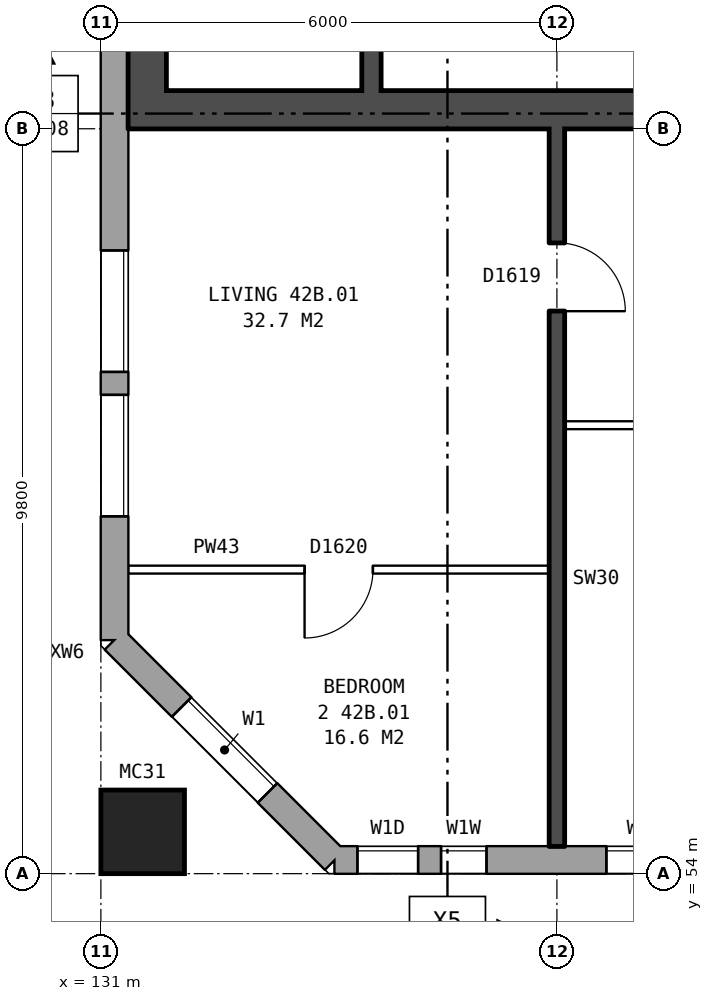
"""IFC4 building model, lengths in metres.
Left out: names, types, materials, properties, quantities, classifications, styles, units other than length and angle.
Written with IfcOpenShell. Run it as: python <this file> out.ifc"""

import sys

from ifc_helpers import new_model, si_unit, direction, frame, frame_2d, origin, origin_2d, place, context, subcontext, project, spatial, rectangle, hollow_rectangle, extrude, element, fill, save


model = new_model("IFC4")
c1 = context("Model", 3, precision=1e-05, world=origin(), true_north=direction((0.0, 1.0)))
c2 = subcontext(c1, "Body", "Model", "MODEL_VIEW")
j1 = project(units=[si_unit("LENGTHUNIT", "METRE"), si_unit("PLANEANGLEUNIT", "RADIAN")], contexts=[c1])
p1 = place(None, origin())
s1 = spatial("IfcSite", under=j1, at=p1, CompositionType="ELEMENT")
p2 = place(p1, origin())
s2 = spatial("IfcBuilding", under=s1, at=p2, CompositionType="ELEMENT")
p3 = place(p2, frame((0.0, 0.0, 151.6)))
s3 = spatial("IfcBuildingStorey", under=s2, at=p3, CompositionType="ELEMENT", Elevation=151.6)
p4 = place(p3, frame((131.55, 54.55, 0.0), z_axis=(0.0, 0.0, 1.0), x_axis=(1.0, 0.0, 0.0)))
e1 = element("IfcColumn", 1, at=p4, inside=s3, PredefinedType="COLUMN", context=c2, shape_type="SweptSolid", body=[
    extrude(hollow_rectangle(XDim=1.1, YDim=1.1, WallThickness=0.06, at=origin_2d()), origin(), (0.0, 0.0, 1.0), 3.1),
])
p5 = place(p3, frame((131.18, 57.075, 0.0), z_axis=(0.0, 0.0, 1.0), x_axis=(0.707106781187, -0.707106781187, 0.0)))
e2 = element("IfcWall", 2, at=p5, inside=s3, PredefinedType="STANDARD", context=c2, shape_type="SweptSolid", body=[
    extrude(rectangle(XDim=4.094, YDim=0.36, at=frame_2d((2.047, 0.0))), origin(), (0.0, 0.0, 1.0), 2.85),
])
p6 = place(p5, frame((1.247, 0.0, 0.8)))
e3 = element("IfcOpeningElement", 3, at=p6, cuts=e2, PredefinedType="OPENING", context=c2, shape_type="SweptSolid", body=[
    extrude(rectangle(XDim=1.6, YDim=1.8, at=frame_2d((0.8, 0.9))), frame((0.0, 0.19, 0.0), z_axis=(0.0, -1.0, 0.0), x_axis=(1.0, 0.0, 0.0)), (0.0, 0.0, 1.0), 0.38),
])
p7 = place(p3, frame((134.075, 54.18, 0.0), z_axis=(0.0, 0.0, 1.0), x_axis=(1.0, 0.0, 0.0)))
e4 = element("IfcWall", 4, at=p7, inside=s3, PredefinedType="STANDARD", context=c2, shape_type="SweptSolid", body=[
    extrude(rectangle(XDim=34.351, YDim=0.36, at=frame_2d((17.175, 0.0))), origin(), (0.0, 0.0, 1.0), 2.85),
])
p8 = place(p7, frame((0.3, 0.0, 0.8)))
e5 = element("IfcOpeningElement", 5, at=p8, cuts=e4, PredefinedType="OPENING", context=c2, shape_type="SweptSolid", body=[
    extrude(rectangle(XDim=0.8, YDim=1.8, at=frame_2d((0.4, 0.9))), frame((0.0, 0.19, 0.0), z_axis=(0.0, -1.0, 0.0), x_axis=(1.0, 0.0, 0.0)), (0.0, 0.0, 1.0), 0.38),
])
p9 = place(p7, frame((3.575, 0.0, 0.8)))
e6 = element("IfcOpeningElement", 6, at=p9, cuts=e4, PredefinedType="OPENING", context=c2, shape_type="SweptSolid", body=[
    extrude(rectangle(XDim=1.0, YDim=1.2, at=frame_2d((0.5, 0.6))), frame((0.0, 0.19, 0.0), z_axis=(0.0, -1.0, 0.0), x_axis=(1.0, 0.0, 0.0)), (0.0, 0.0, 1.0), 0.38),
])
p10 = place(p7, frame((6.625, 0.0, 0.8)))
e7 = element("IfcOpeningElement", 7, at=p10, cuts=e4, PredefinedType="OPENING", context=c2, shape_type="SweptSolid", body=[
    extrude(rectangle(XDim=1.6, YDim=1.8, at=frame_2d((0.8, 0.9))), frame((0.0, 0.19, 0.0), z_axis=(0.0, -1.0, 0.0), x_axis=(1.0, 0.0, 0.0)), (0.0, 0.0, 1.0), 0.38),
])
p11 = place(p7, frame((9.625, 0.0, 0.8)))
e8 = element("IfcOpeningElement", 8, at=p11, cuts=e4, PredefinedType="OPENING", context=c2, shape_type="SweptSolid", body=[
    extrude(rectangle(XDim=1.6, YDim=1.8, at=frame_2d((0.8, 0.9))), frame((0.0, 0.19, 0.0), z_axis=(0.0, -1.0, 0.0), x_axis=(1.0, 0.0, 0.0)), (0.0, 0.0, 1.0), 0.38),
])
p12 = place(p7, frame((12.625, 0.0, 0.8)))
e9 = element("IfcOpeningElement", 9, at=p12, cuts=e4, PredefinedType="OPENING", context=c2, shape_type="SweptSolid", body=[
    extrude(rectangle(XDim=1.6, YDim=1.8, at=frame_2d((0.8, 0.9))), frame((0.0, 0.19, 0.0), z_axis=(0.0, -1.0, 0.0), x_axis=(1.0, 0.0, 0.0)), (0.0, 0.0, 1.0), 0.38),
])
p13 = place(p7, frame((15.625, 0.0, 0.8)))
e10 = element("IfcOpeningElement", 10, at=p13, cuts=e4, PredefinedType="OPENING", context=c2, shape_type="SweptSolid", body=[
    extrude(rectangle(XDim=1.6, YDim=1.8, at=frame_2d((0.8, 0.9))), frame((0.0, 0.19, 0.0), z_axis=(0.0, -1.0, 0.0), x_axis=(1.0, 0.0, 0.0)), (0.0, 0.0, 1.0), 0.38),
])
p14 = place(p7, frame((18.625, 0.0, 0.8)))
e11 = element("IfcOpeningElement", 11, at=p14, cuts=e4, PredefinedType="OPENING", context=c2, shape_type="SweptSolid", body=[
    extrude(rectangle(XDim=1.6, YDim=1.8, at=frame_2d((0.8, 0.9))), frame((0.0, 0.19, 0.0), z_axis=(0.0, -1.0, 0.0), x_axis=(1.0, 0.0, 0.0)), (0.0, 0.0, 1.0), 0.38),
])
p15 = place(p7, frame((21.625, 0.0, 0.8)))
e12 = element("IfcOpeningElement", 12, at=p15, cuts=e4, PredefinedType="OPENING", context=c2, shape_type="SweptSolid", body=[
    extrude(rectangle(XDim=1.6, YDim=1.8, at=frame_2d((0.8, 0.9))), frame((0.0, 0.19, 0.0), z_axis=(0.0, -1.0, 0.0), x_axis=(1.0, 0.0, 0.0)), (0.0, 0.0, 1.0), 0.38),
])
p16 = place(p7, frame((24.625, 0.0, 0.8)))
e13 = element("IfcOpeningElement", 13, at=p16, cuts=e4, PredefinedType="OPENING", context=c2, shape_type="SweptSolid", body=[
    extrude(rectangle(XDim=1.6, YDim=1.8, at=frame_2d((0.8, 0.9))), frame((0.0, 0.19, 0.0), z_axis=(0.0, -1.0, 0.0), x_axis=(1.0, 0.0, 0.0)), (0.0, 0.0, 1.0), 0.38),
])
p17 = place(p7, frame((27.625, 0.0, 0.8)))
e14 = element("IfcOpeningElement", 14, at=p17, cuts=e4, PredefinedType="OPENING", context=c2, shape_type="SweptSolid", body=[
    extrude(rectangle(XDim=1.6, YDim=1.8, at=frame_2d((0.8, 0.9))), frame((0.0, 0.19, 0.0), z_axis=(0.0, -1.0, 0.0), x_axis=(1.0, 0.0, 0.0)), (0.0, 0.0, 1.0), 0.38),
])
p18 = place(p7, frame((29.525, 0.0, 0.8)))
e15 = element("IfcOpeningElement", 15, at=p18, cuts=e4, PredefinedType="OPENING", context=c2, shape_type="SweptSolid", body=[
    extrude(rectangle(XDim=0.6, YDim=1.8, at=frame_2d((0.3, 0.9))), frame((0.0, 0.19, 0.0), z_axis=(0.0, -1.0, 0.0), x_axis=(1.0, 0.0, 0.0)), (0.0, 0.0, 1.0), 0.38),
])
p19 = place(p7, frame((1.4, 0.0, 1.6)))
e16 = element("IfcOpeningElement", 16, at=p19, cuts=e4, PredefinedType="OPENING", context=c2, shape_type="SweptSolid", body=[
    extrude(rectangle(XDim=0.6, YDim=0.9, at=frame_2d((0.3, 0.45))), frame((0.0, 0.19, 0.0), z_axis=(0.0, -1.0, 0.0), x_axis=(1.0, 0.0, 0.0)), (0.0, 0.0, 1.0), 0.38),
])
p20 = place(p7, frame((4.875, 0.0, 0.8)))
e17 = element("IfcOpeningElement", 17, at=p20, cuts=e4, PredefinedType="OPENING", context=c2, shape_type="SweptSolid", body=[
    extrude(rectangle(XDim=1.4, YDim=1.8, at=frame_2d((0.7, 0.9))), frame((0.0, 0.19, 0.0), z_axis=(0.0, -1.0, 0.0), x_axis=(1.0, 0.0, 0.0)), (0.0, 0.0, 1.0), 0.38),
])
p21 = place(p7, frame((30.425, 0.0, 0.8)))
e18 = element("IfcOpeningElement", 18, at=p21, cuts=e4, PredefinedType="OPENING", context=c2, shape_type="SweptSolid", body=[
    extrude(rectangle(XDim=0.6, YDim=0.9, at=frame_2d((0.3, 0.45))), frame((0.0, 0.19, 0.0), z_axis=(0.0, -1.0, 0.0), x_axis=(1.0, 0.0, 0.0)), (0.0, 0.0, 1.0), 0.38),
])
p22 = place(p3, frame((131.18, 82.925, 0.0), z_axis=(0.0, 0.0, 1.0), x_axis=(0.0, -1.0, 0.0)))
e19 = element("IfcWall", 19, at=p22, inside=s3, PredefinedType="STANDARD", context=c2, shape_type="SweptSolid", body=[
    extrude(rectangle(XDim=25.851, YDim=0.36, at=frame_2d((12.925, 0.0))), origin(), (0.0, 0.0, 1.0), 2.85),
])
p23 = place(p22, frame((1.625, 0.0, 0.8)))
e20 = element("IfcOpeningElement", 20, at=p23, cuts=e19, PredefinedType="OPENING", context=c2, shape_type="SweptSolid", body=[
    extrude(rectangle(XDim=1.6, YDim=1.8, at=frame_2d((0.8, 0.9))), frame((0.0, 0.19, 0.0), z_axis=(0.0, -1.0, 0.0), x_axis=(1.0, 0.0, 0.0)), (0.0, 0.0, 1.0), 0.38),
])
p24 = place(p22, frame((3.525, 0.0, 1.7)))
e21 = element("IfcOpeningElement", 21, at=p24, cuts=e19, PredefinedType="OPENING", context=c2, shape_type="SweptSolid", body=[
    extrude(rectangle(XDim=1.6, YDim=0.9, at=frame_2d((0.8, 0.45))), frame((0.0, 0.19, 0.0), z_axis=(0.0, -1.0, 0.0), x_axis=(1.0, 0.0, 0.0)), (0.0, 0.0, 1.0), 0.38),
])
p25 = place(p22, frame((20.725, 0.0, 1.7)))
e22 = element("IfcOpeningElement", 22, at=p25, cuts=e19, PredefinedType="OPENING", context=c2, shape_type="SweptSolid", body=[
    extrude(rectangle(XDim=1.6, YDim=0.9, at=frame_2d((0.8, 0.45))), frame((0.0, 0.19, 0.0), z_axis=(0.0, -1.0, 0.0), x_axis=(1.0, 0.0, 0.0)), (0.0, 0.0, 1.0), 0.38),
])
p26 = place(p22, frame((22.625, 0.0, 0.8)))
e23 = element("IfcOpeningElement", 23, at=p26, cuts=e19, PredefinedType="OPENING", context=c2, shape_type="SweptSolid", body=[
    extrude(rectangle(XDim=1.6, YDim=1.8, at=frame_2d((0.8, 0.9))), frame((0.0, 0.19, 0.0), z_axis=(0.0, -1.0, 0.0), x_axis=(1.0, 0.0, 0.0)), (0.0, 0.0, 1.0), 0.38),
])
p27 = place(p3, frame((131.61, 63.8, 0.0), z_axis=(0.0, 0.0, 1.0), x_axis=(0.0, 1.0, 0.0)))
e24 = element("IfcWall", 24, at=p27, inside=s3, PredefinedType="SHEAR", context=c2, shape_type="SweptSolid", body=[
    extrude(rectangle(XDim=12.4, YDim=0.5, at=frame_2d((6.2, 0.0))), origin(), (0.0, 0.0, 1.0), 2.85),
])
p28 = place(p3, frame((139.26, 64.05, 0.0), z_axis=(0.0, 0.0, 1.0), x_axis=(-1.0, 0.0, 0.0)))
e25 = element("IfcWall", 25, at=p28, inside=s3, PredefinedType="SHEAR", context=c2, shape_type="SweptSolid", body=[
    extrude(rectangle(XDim=7.4, YDim=0.5, at=frame_2d((3.7, 0.0))), origin(), (0.0, 0.0, 1.0), 2.85),
])
p29 = place(p3, frame((134.56, 64.3, 0.0), z_axis=(0.0, 0.0, 1.0), x_axis=(0.0, 1.0, 0.0)))
e26 = element("IfcWall", 26, at=p29, inside=s3, PredefinedType="SHEAR", context=c2, shape_type="SweptSolid", body=[
    extrude(rectangle(XDim=6.825, YDim=0.25, at=frame_2d((3.413, 0.0))), origin(), (0.0, 0.0, 1.0), 2.85),
])
p30 = place(p3, frame((131.36, 58.0, 0.0), z_axis=(0.0, 0.0, 1.0), x_axis=(1.0, 0.0, 0.0)))
e27 = element("IfcWall", 27, at=p30, inside=s3, PredefinedType="PARTITIONING", context=c2, shape_type="SweptSolid", body=[
    extrude(rectangle(XDim=5.54, YDim=0.1, at=frame_2d((2.77, 0.0))), origin(), (0.0, 0.0, 1.0), 2.85),
])
p31 = place(p30, frame((2.32, 0.0, 0.0)))
e28 = element("IfcOpeningElement", 28, at=p31, cuts=e27, PredefinedType="OPENING", context=c2, shape_type="SweptSolid", body=[
    extrude(rectangle(XDim=0.9, YDim=2.1, at=frame_2d((0.45, 1.05))), frame((0.0, 0.06, 0.0), z_axis=(0.0, -1.0, 0.0), x_axis=(1.0, 0.0, 0.0)), (0.0, 0.0, 1.0), 0.12),
])
p32 = place(p3, frame((137.1, 59.9, 0.0), z_axis=(0.0, 0.0, 1.0), x_axis=(1.0, 0.0, 0.0)))
e29 = element("IfcWall", 29, at=p32, inside=s3, PredefinedType="PARTITIONING", context=c2, shape_type="SweptSolid", body=[
    extrude(rectangle(XDim=5.8, YDim=0.1, at=frame_2d((2.9, 0.0))), origin(), (0.0, 0.0, 1.0), 2.85),
])
p33 = place(p32, frame((1.3, 0.0, 0.0)))
e30 = element("IfcOpeningElement", 30, at=p33, cuts=e29, PredefinedType="OPENING", context=c2, shape_type="SweptSolid", body=[
    extrude(rectangle(XDim=0.9, YDim=2.1, at=frame_2d((0.45, 1.05))), frame((0.0, 0.06, 0.0), z_axis=(0.0, -1.0, 0.0), x_axis=(1.0, 0.0, 0.0)), (0.0, 0.0, 1.0), 0.12),
])
p34 = place(p32, frame((4.2, 0.0, 0.0)))
e31 = element("IfcOpeningElement", 31, at=p34, cuts=e29, PredefinedType="OPENING", context=c2, shape_type="SweptSolid", body=[
    extrude(rectangle(XDim=0.9, YDim=2.1, at=frame_2d((0.45, 1.05))), frame((0.0, 0.06, 0.0), z_axis=(0.0, -1.0, 0.0), x_axis=(1.0, 0.0, 0.0)), (0.0, 0.0, 1.0), 0.12),
])
p35 = place(p3, frame((137.0, 54.36, 0.0), z_axis=(0.0, 0.0, 1.0), x_axis=(0.0, 1.0, 0.0)))
e32 = element("IfcWall", 32, at=p35, inside=s3, PredefinedType="SOLIDWALL", context=c2, shape_type="SweptSolid", body=[
    extrude(rectangle(XDim=9.44, YDim=0.2, at=frame_2d((4.72, 0.0))), origin(), (0.0, 0.0, 1.0), 2.85),
])
p36 = place(p35, frame((7.04, 0.0, 0.0)))
e33 = element("IfcOpeningElement", 33, at=p36, cuts=e32, PredefinedType="OPENING", context=c2, shape_type="SweptSolid", body=[
    extrude(rectangle(XDim=0.9, YDim=2.1, at=frame_2d((0.45, 1.05))), frame((0.0, 0.11, 0.0), z_axis=(0.0, -1.0, 0.0), x_axis=(1.0, 0.0, 0.0)), (0.0, 0.0, 1.0), 0.22),
])
p37 = place(p6, origin())
e34 = element("IfcWindow", 34, at=p37, inside=s3, PartitioningType="SINGLE_PANEL", PredefinedType="WINDOW", context=c2, shape_type="SweptSolid", body=[
    extrude(rectangle(XDim=1.6, YDim=1.8, at=frame_2d((0.8, 0.9))), frame((0.0, 0.15, 0.0), z_axis=(0.0, -1.0, 0.0), x_axis=(1.0, 0.0, 0.0)), (0.0, 0.0, 1.0), 0.06),
])
fill(e3, e34)
p38 = place(p8, origin())
e35 = element("IfcWindow", 35, at=p38, inside=s3, PartitioningType="SINGLE_PANEL", PredefinedType="WINDOW", context=c2, shape_type="SweptSolid", body=[
    extrude(rectangle(XDim=0.8, YDim=1.8, at=frame_2d((0.4, 0.9))), frame((0.0, 0.15, 0.0), z_axis=(0.0, -1.0, 0.0), x_axis=(1.0, 0.0, 0.0)), (0.0, 0.0, 1.0), 0.06),
])
fill(e5, e35)
p39 = place(p9, origin())
e36 = element("IfcWindow", 36, at=p39, inside=s3, PartitioningType="SINGLE_PANEL", PredefinedType="WINDOW", context=c2, shape_type="SweptSolid", body=[
    extrude(rectangle(XDim=1.0, YDim=1.2, at=frame_2d((0.5, 0.6))), frame((0.0, 0.15, 0.0), z_axis=(0.0, -1.0, 0.0), x_axis=(1.0, 0.0, 0.0)), (0.0, 0.0, 1.0), 0.06),
])
fill(e6, e36)
p40 = place(p25, origin())
e37 = element("IfcWindow", 37, at=p40, inside=s3, PartitioningType="SINGLE_PANEL", PredefinedType="WINDOW", context=c2, shape_type="SweptSolid", body=[
    extrude(rectangle(XDim=1.6, YDim=0.9, at=frame_2d((0.8, 0.45))), frame((0.0, 0.15, 0.0), z_axis=(0.0, -1.0, 0.0), x_axis=(1.0, 0.0, 0.0)), (0.0, 0.0, 1.0), 0.06),
])
fill(e22, e37)
p41 = place(p26, origin())
e38 = element("IfcWindow", 38, at=p41, inside=s3, PartitioningType="SINGLE_PANEL", PredefinedType="WINDOW", context=c2, shape_type="SweptSolid", body=[
    extrude(rectangle(XDim=1.6, YDim=1.8, at=frame_2d((0.8, 0.9))), frame((0.0, 0.15, 0.0), z_axis=(0.0, -1.0, 0.0), x_axis=(1.0, 0.0, 0.0)), (0.0, 0.0, 1.0), 0.06),
])
fill(e23, e38)
p42 = place(p31, frame((0.9, 0.0, 0.0), z_axis=(0.0, 0.0, 1.0), x_axis=(-1.0, 0.0, 0.0)))
e39 = element("IfcDoor", 39, at=p42, inside=s3, OperationType="SINGLE_SWING_RIGHT", PredefinedType="DOOR", context=c2, shape_type="SweptSolid", body=[
    extrude(rectangle(XDim=0.9, YDim=2.1, at=frame_2d((0.45, 1.05))), frame((0.0, 0.025, 0.0), z_axis=(0.0, -1.0, 0.0), x_axis=(1.0, 0.0, 0.0)), (0.0, 0.0, 1.0), 0.05),
])
fill(e28, e39)
p43 = place(p36, frame((0.9, 0.0, 0.0), z_axis=(0.0, 0.0, 1.0), x_axis=(-1.0, 0.0, 0.0)))
e40 = element("IfcDoor", 40, at=p43, inside=s3, OperationType="SINGLE_SWING_RIGHT", PredefinedType="DOOR", context=c2, shape_type="SweptSolid", body=[
    extrude(rectangle(XDim=0.9, YDim=2.1, at=frame_2d((0.45, 1.05))), frame((0.0, 0.025, 0.0), z_axis=(0.0, -1.0, 0.0), x_axis=(1.0, 0.0, 0.0)), (0.0, 0.0, 1.0), 0.05),
])
fill(e33, e40)
p44 = place(p19, origin())
e41 = element("IfcWindow", 41, at=p44, inside=s3, PartitioningType="SINGLE_PANEL", PredefinedType="WINDOW", context=c2, shape_type="SweptSolid", body=[
    extrude(rectangle(XDim=0.6, YDim=0.9, at=frame_2d((0.3, 0.45))), frame((0.0, 0.15, 0.0), z_axis=(0.0, -1.0, 0.0), x_axis=(1.0, 0.0, 0.0)), (0.0, 0.0, 1.0), 0.06),
])
fill(e16, e41)
save(model, sys.argv[1])
